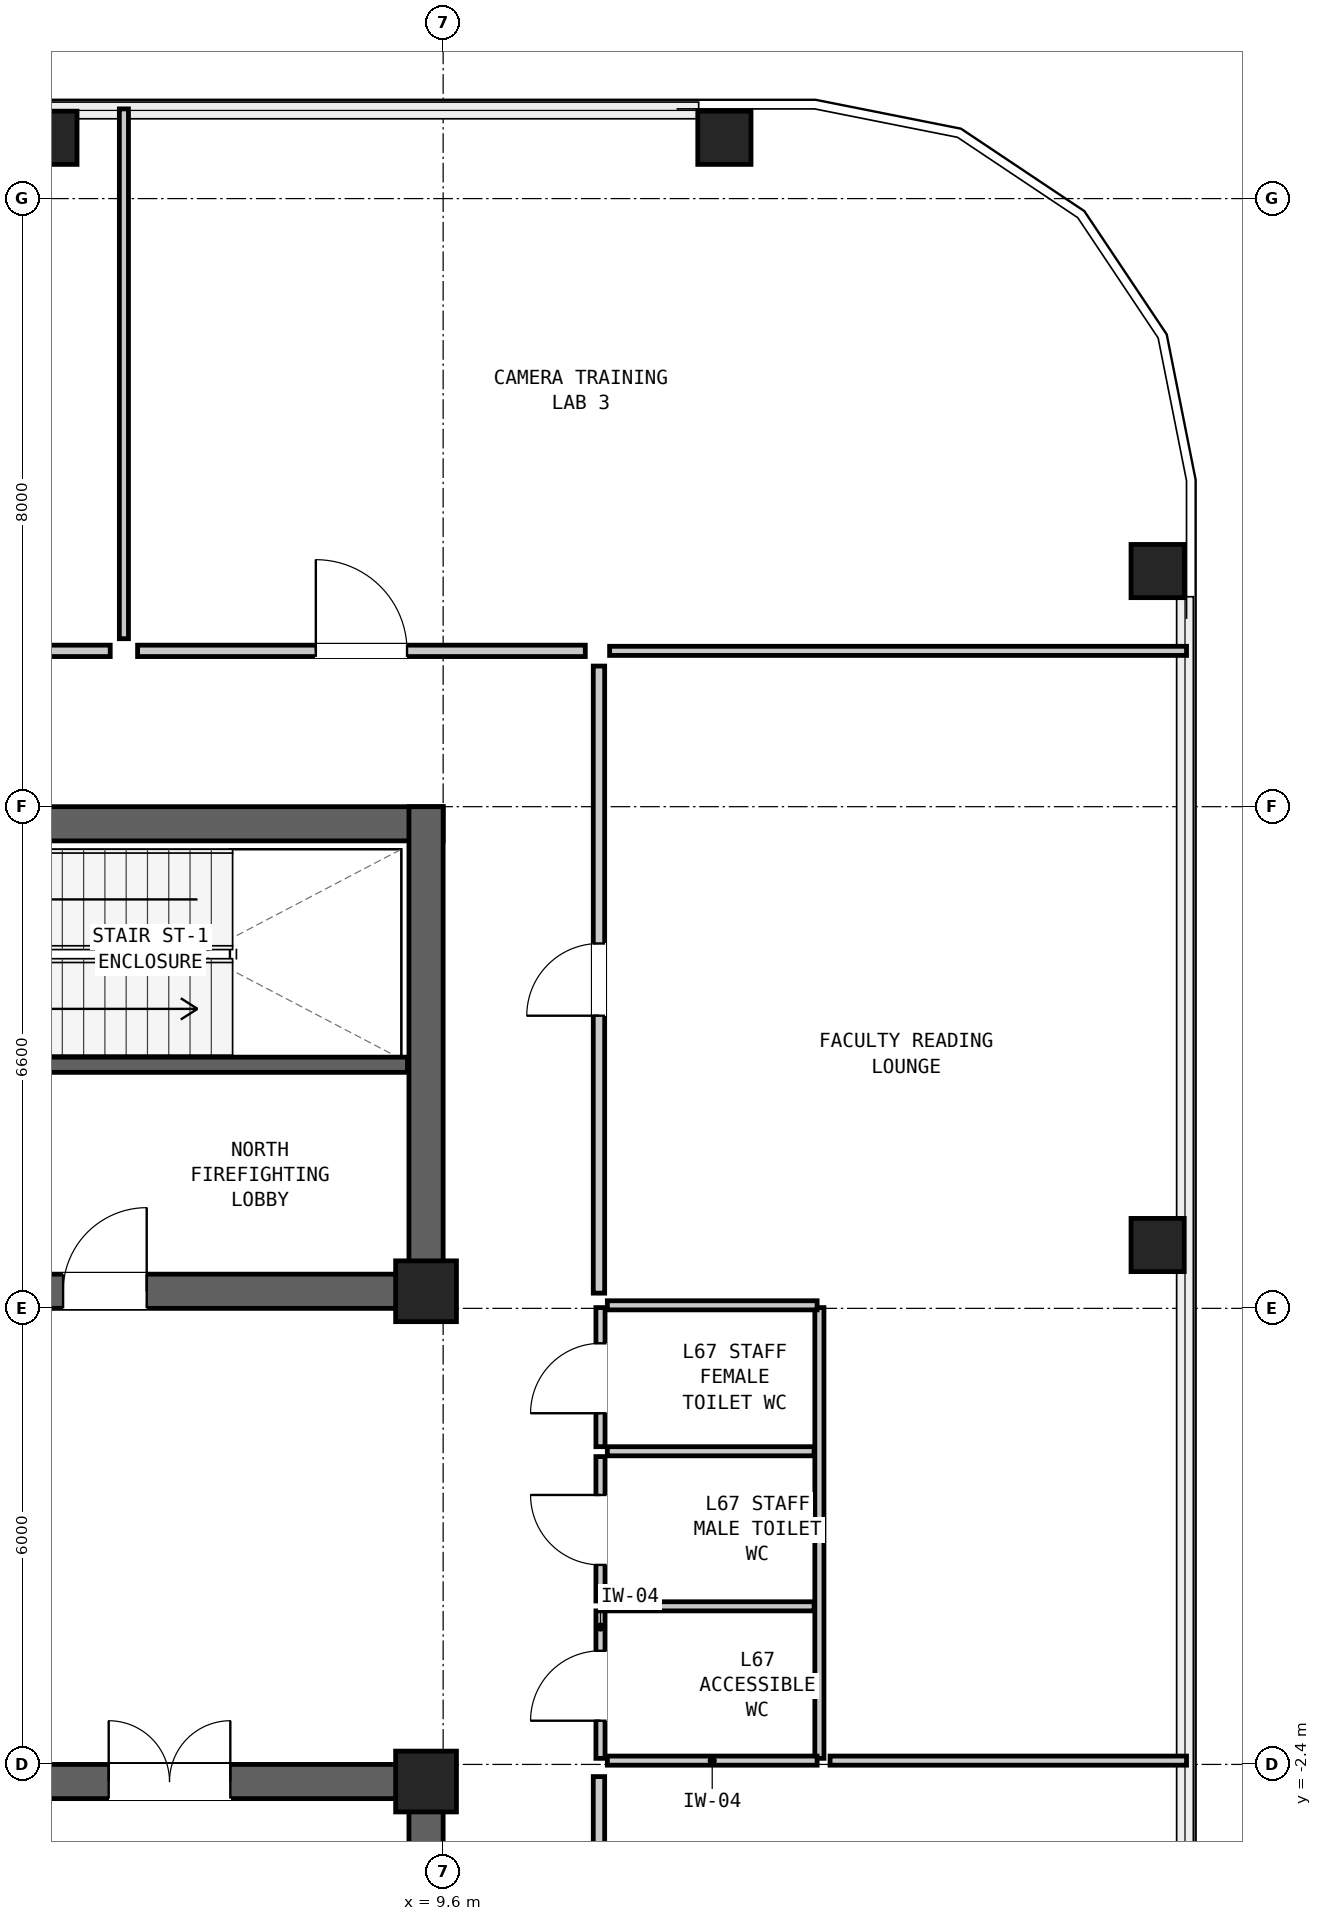
"""IFC4 building model, lengths in metres.
Left out: names, types, materials, properties, quantities, classifications, styles, units other than length and angle.
Written with IfcOpenShell. Run it as: python <this file> out.ifc"""

import sys

from ifc_helpers import new_model, si_unit, direction, frame, frame_2d, origin, origin_2d, place, context, subcontext, project, spatial, rectangle, hollow_rectangle, extrude, element, fill, save


model = new_model("IFC4")
c1 = context("Model", 3, precision=1e-05, world=origin(), true_north=direction((0.0, 1.0)))
c2 = subcontext(c1, "Body", "Model", "MODEL_VIEW")
j1 = project(units=[si_unit("LENGTHUNIT", "METRE"), si_unit("PLANEANGLEUNIT", "RADIAN")], contexts=[c1])
p1 = place(None, origin())
s1 = spatial("IfcSite", under=j1, at=p1, CompositionType="ELEMENT")
p2 = place(p1, origin())
s2 = spatial("IfcBuilding", under=s1, at=p2, CompositionType="ELEMENT")
p3 = place(p2, frame((0.0, 0.0, 226.95)))
s3 = spatial("IfcBuildingStorey", under=s2, at=p3, CompositionType="ELEMENT", Elevation=226.95)
p4 = place(p3, frame((-9.6, 9.975, 0.0), z_axis=(0.0, 0.0, 1.0), x_axis=(1.0, 0.0, 0.0)))
e1 = element("IfcWall", 1, at=p4, inside=s3, PredefinedType="SHEAR", context=c2, shape_type="SweptSolid", body=[
    extrude(rectangle(XDim=19.2, YDim=0.45, at=frame_2d((9.6, 0.0))), origin(), (0.0, 0.0, 1.0), 4.35),
])
p5 = place(p3, frame((-9.6, 3.825, 0.0), z_axis=(0.0, 0.0, 1.0), x_axis=(1.0, 0.0, 0.0)))
e2 = element("IfcWall", 2, at=p5, inside=s3, PredefinedType="SHEAR", context=c2, shape_type="SweptSolid", body=[
    extrude(rectangle(XDim=19.2, YDim=0.45, at=frame_2d((9.6, 0.0))), origin(), (0.0, 0.0, 1.0), 4.35),
])
p6 = place(p5, frame((14.2, 0.0, 0.0)))
e3 = element("IfcOpeningElement", 3, at=p6, cuts=e2, PredefinedType="OPENING", context=c2, shape_type="SweptSolid", body=[
    extrude(rectangle(XDim=1.1, YDim=2.08, at=frame_2d((0.55, 1.04))), frame((0.0, 0.237, 0.0), z_axis=(0.0, -1.0, 0.0), x_axis=(1.0, 0.0, 0.0)), (0.0, 0.0, 1.0), 0.474),
])
p7 = place(p5, frame((8.2, 0.0, 0.0)))
e4 = element("IfcOpeningElement", 4, at=p7, cuts=e2, PredefinedType="OPENING", context=c2, shape_type="SweptSolid", body=[
    extrude(rectangle(XDim=1.15, YDim=2.1, at=frame_2d((0.575, 1.05))), frame((0.0, 0.237, 0.0), z_axis=(0.0, -1.0, 0.0), x_axis=(1.0, 0.0, 0.0)), (0.0, 0.0, 1.0), 0.474),
])
p8 = place(p5, frame((2.5, 0.0, 0.0)))
e5 = element("IfcOpeningElement", 5, at=p8, cuts=e2, PredefinedType="OPENING", context=c2, shape_type="SweptSolid", body=[
    extrude(rectangle(XDim=1.2, YDim=2.1, at=frame_2d((0.6, 1.05))), frame((0.0, 0.237, 0.0), z_axis=(0.0, -1.0, 0.0), x_axis=(1.0, 0.0, 0.0)), (0.0, 0.0, 1.0), 0.474),
])
p9 = place(p3, frame((9.375, 3.6, 0.0), z_axis=(0.0, 0.0, 1.0), x_axis=(0.0, 1.0, 0.0)))
e6 = element("IfcWall", 6, at=p9, inside=s3, PredefinedType="SHEAR", context=c2, shape_type="SweptSolid", body=[
    extrude(rectangle(XDim=6.6, YDim=0.45, at=frame_2d((3.3, 0.0))), origin(), (0.0, 0.0, 1.0), 4.35),
])
p10 = place(p3, frame((-9.6, -2.625, 0.0), z_axis=(0.0, 0.0, 1.0), x_axis=(1.0, 0.0, 0.0)))
e7 = element("IfcWall", 7, at=p10, inside=s3, PredefinedType="SHEAR", context=c2, shape_type="SweptSolid", body=[
    extrude(rectangle(XDim=19.2, YDim=0.45, at=frame_2d((9.6, 0.0))), origin(), (0.0, 0.0, 1.0), 4.35),
])
p11 = place(p10, frame((3.8, 0.0, 0.0)))
e8 = element("IfcOpeningElement", 8, at=p11, cuts=e7, PredefinedType="OPENING", context=c2, shape_type="SweptSolid", body=[
    extrude(rectangle(XDim=1.1, YDim=2.08, at=frame_2d((0.55, 1.04))), frame((0.0, 0.237, 0.0), z_axis=(0.0, -1.0, 0.0), x_axis=(1.0, 0.0, 0.0)), (0.0, 0.0, 1.0), 0.474),
])
p12 = place(p10, frame((10.8, 0.0, 0.0)))
e9 = element("IfcOpeningElement", 9, at=p12, cuts=e7, PredefinedType="OPENING", context=c2, shape_type="SweptSolid", body=[
    extrude(rectangle(XDim=0.95, YDim=2.1, at=frame_2d((0.475, 1.05))), frame((0.0, 0.237, 0.0), z_axis=(0.0, -1.0, 0.0), x_axis=(1.0, 0.0, 0.0)), (0.0, 0.0, 1.0), 0.474),
])
p13 = place(p10, frame((14.8, 0.0, 0.0)))
e10 = element("IfcOpeningElement", 10, at=p13, cuts=e7, PredefinedType="OPENING", context=c2, shape_type="SweptSolid", body=[
    extrude(rectangle(XDim=1.6, YDim=2.12, at=frame_2d((0.8, 1.06))), frame((0.0, 0.237, 0.0), z_axis=(0.0, -1.0, 0.0), x_axis=(1.0, 0.0, 0.0)), (0.0, 0.0, 1.0), 0.474),
])
p14 = place(p3, frame((9.375, -9.0, 0.0), z_axis=(0.0, 0.0, 1.0), x_axis=(0.0, 1.0, 0.0)))
e11 = element("IfcWall", 11, at=p14, inside=s3, PredefinedType="SHEAR", context=c2, shape_type="SweptSolid", body=[
    extrude(rectangle(XDim=6.6, YDim=0.45, at=frame_2d((3.3, 0.0))), origin(), (0.0, 0.0, 1.0), 4.35),
])
for number, where, z_axis, x_axis in (
    (12, (19.0, 4.433, 0.0), (0.0, 0.0, 1.0), (0.0, 1.0, 0.0)),
    (13, (19.0, 13.3, 0.0), (0.0, 0.0, 1.0), (0.0, 1.0, 0.0)),
    (14, (13.3, 19.0, 0.0), (0.0, 0.0, 1.0), (1.0, 0.0, 0.0)),
    (15, (4.433, 19.0, 0.0), (0.0, 0.0, 1.0), (1.0, 0.0, 0.0)),
):
    element("IfcColumn", number, at=place(p3, frame(where, z_axis=z_axis, x_axis=x_axis)), inside=s3, PredefinedType="COLUMN", context=c2, shape_type="SweptSolid", body=[
        extrude(hollow_rectangle(XDim=0.7, YDim=0.7, WallThickness=0.045, at=origin_2d()), origin(), (0.0, 0.0, 1.0), 4.35),
    ])
for number, where, z_axis, x_axis in (
    (16, (9.375, 3.825, 0.0), (0.0, 0.0, 1.0), (1.0, 0.0, 0.0)),
    (17, (9.375, -2.625, 0.0), (0.0, 0.0, 1.0), (1.0, 0.0, 0.0)),
):
    element("IfcColumn", number, at=place(p3, frame(where, z_axis=z_axis, x_axis=x_axis)), inside=s3, PredefinedType="COLUMN", context=c2, shape_type="SweptSolid", body=[
        extrude(rectangle(XDim=0.8, YDim=0.8, at=origin_2d()), origin(), (0.0, 0.0, 1.0), 4.35),
    ])
p15 = place(p3, frame((2.36, 6.805, 0.0), z_axis=(0.0, 0.0, 1.0), x_axis=(1.0, 0.0, 0.0)))
e18 = element("IfcWall", 18, at=p15, inside=s3, PredefinedType="SHEAR", context=c2, shape_type="SweptSolid", body=[
    extrude(rectangle(XDim=6.77, YDim=0.2, at=frame_2d((3.385, 0.0))), origin(), (0.0, 0.0, 1.0), 4.07),
])
p16 = place(p15, frame((0.3, 0.0, 0.0)))
e19 = element("IfcOpeningElement", 19, at=p16, cuts=e18, PredefinedType="OPENING", context=c2, shape_type="SweptSolid", body=[
    extrude(rectangle(XDim=1.05, YDim=2.08, at=frame_2d((0.525, 1.04))), frame((0.0, 0.112, 0.0), z_axis=(0.0, -1.0, 0.0), x_axis=(1.0, 0.0, 0.0)), (0.0, 0.0, 1.0), 0.224),
])
p17 = place(p3, frame((11.67, -2.32, 0.0), z_axis=(0.0, 0.0, 1.0), x_axis=(0.0, 1.0, 0.0)))
e20 = element("IfcWall", 20, at=p17, inside=s3, PredefinedType="PARTITIONING", context=c2, shape_type="SweptSolid", body=[
    extrude(rectangle(XDim=1.94, YDim=0.12, at=frame_2d((0.97, 0.0))), origin(), (0.0, 0.0, 1.0), 4.07),
])
p18 = place(p17, frame((0.495, 0.0, 0.0)))
e21 = element("IfcOpeningElement", 21, at=p18, cuts=e20, PredefinedType="OPENING", context=c2, shape_type="SweptSolid", body=[
    extrude(rectangle(XDim=0.92, YDim=2.1, at=frame_2d((0.46, 1.05))), frame((0.0, 0.072, 0.0), z_axis=(0.0, -1.0, 0.0), x_axis=(1.0, 0.0, 0.0)), (0.0, 0.0, 1.0), 0.144),
])
p19 = place(p3, frame((11.67, -0.25, 0.0), z_axis=(0.0, 0.0, 1.0), x_axis=(0.0, 1.0, 0.0)))
e22 = element("IfcWall", 22, at=p19, inside=s3, PredefinedType="PARTITIONING", context=c2, shape_type="SweptSolid", body=[
    extrude(rectangle(XDim=1.9, YDim=0.12, at=frame_2d((0.95, 0.0))), origin(), (0.0, 0.0, 1.0), 4.07),
])
p20 = place(p19, frame((0.475, 0.0, 0.0)))
e23 = element("IfcOpeningElement", 23, at=p20, cuts=e22, PredefinedType="OPENING", context=c2, shape_type="SweptSolid", body=[
    extrude(rectangle(XDim=0.92, YDim=2.1, at=frame_2d((0.46, 1.05))), frame((0.0, 0.072, 0.0), z_axis=(0.0, -1.0, 0.0), x_axis=(1.0, 0.0, 0.0)), (0.0, 0.0, 1.0), 0.144),
])
p21 = place(p3, frame((11.67, 1.78, 0.0), z_axis=(0.0, 0.0, 1.0), x_axis=(0.0, 1.0, 0.0)))
e24 = element("IfcWall", 24, at=p21, inside=s3, PredefinedType="PARTITIONING", context=c2, shape_type="SweptSolid", body=[
    extrude(rectangle(XDim=1.83, YDim=0.12, at=frame_2d((0.915, 0.0))), origin(), (0.0, 0.0, 1.0), 4.07),
])
p22 = place(p21, frame((0.44, 0.0, 0.0)))
e25 = element("IfcOpeningElement", 25, at=p22, cuts=e24, PredefinedType="OPENING", context=c2, shape_type="SweptSolid", body=[
    extrude(rectangle(XDim=0.92, YDim=2.1, at=frame_2d((0.46, 1.05))), frame((0.0, 0.072, 0.0), z_axis=(0.0, -1.0, 0.0), x_axis=(1.0, 0.0, 0.0)), (0.0, 0.0, 1.0), 0.144),
])
p23 = place(p3, frame((14.55, -2.32, 0.0), z_axis=(0.0, 0.0, 1.0), x_axis=(0.0, 1.0, 0.0)))
e26 = element("IfcWall", 26, at=p23, inside=s3, PredefinedType="PARTITIONING", context=c2, shape_type="SweptSolid", body=[
    extrude(rectangle(XDim=5.93, YDim=0.12, at=frame_2d((2.965, 0.0))), origin(), (0.0, 0.0, 1.0), 4.07),
])
for number, where, z_axis, x_axis in (
    (27, (11.76, -2.35, 0.0), (0.0, 0.0, 1.0), (1.0, 0.0, 0.0)),
    (28, (11.76, 3.64, 0.0), (0.0, 0.0, 1.0), (1.0, 0.0, 0.0)),
):
    element("IfcWall", number, at=place(p3, frame(where, z_axis=z_axis, x_axis=x_axis)), inside=s3, PredefinedType="PARTITIONING", context=c2, shape_type="SweptSolid", body=[
        extrude(rectangle(XDim=2.76, YDim=0.12, at=frame_2d((1.38, 0.0))), origin(), (0.0, 0.0, 1.0), 2.25),
    ])
p24 = place(p3, frame((11.76, -0.32, 0.0), z_axis=(0.0, 0.0, 1.0), x_axis=(1.0, 0.0, 0.0)))
e29 = element("IfcWall", 29, at=p24, inside=s3, PredefinedType="PARTITIONING", context=c2, shape_type="SweptSolid", body=[
    extrude(rectangle(XDim=2.72, YDim=0.12, at=frame_2d((1.36, 0.0))), origin(), (0.0, 0.0, 1.0), 4.07),
])
p25 = place(p3, frame((11.76, 1.72, 0.0), z_axis=(0.0, 0.0, 1.0), x_axis=(1.0, 0.0, 0.0)))
e30 = element("IfcWall", 30, at=p25, inside=s3, PredefinedType="PARTITIONING", context=c2, shape_type="SweptSolid", body=[
    extrude(rectangle(XDim=2.72, YDim=0.12, at=frame_2d((1.36, 0.0))), origin(), (0.0, 0.0, 1.0), 2.25),
])
p26 = place(p3, frame((11.79, 12.25, 0.0), z_axis=(0.0, 0.0, 1.0), x_axis=(1.0, 0.0, 0.0)))
e31 = element("IfcWall", 31, at=p26, inside=s3, PredefinedType="PARTITIONING", context=c2, shape_type="SweptSolid", body=[
    extrude(rectangle(XDim=7.59, YDim=0.12, at=frame_2d((3.795, 0.0))), origin(), (0.0, 0.0, 1.0), 4.07),
])
p27 = place(p3, frame((5.4, 12.41, 0.0), z_axis=(0.0, 0.0, 1.0), x_axis=(0.0, 1.0, 0.0)))
e32 = element("IfcWall", 32, at=p27, inside=s3, PredefinedType="PARTITIONING", context=c2, shape_type="SweptSolid", body=[
    extrude(rectangle(XDim=6.97, YDim=0.12, at=frame_2d((3.485, 0.0))), origin(), (0.0, 0.0, 1.0), 4.07),
])
p28 = place(p3, frame((14.69, -2.35, 0.0), z_axis=(0.0, 0.0, 1.0), x_axis=(1.0, 0.0, 0.0)))
e33 = element("IfcWall", 33, at=p28, inside=s3, PredefinedType="PARTITIONING", context=c2, shape_type="SweptSolid", body=[
    extrude(rectangle(XDim=4.69, YDim=0.12, at=frame_2d((2.345, 0.0))), origin(), (0.0, 0.0, 1.0), 2.25),
])
p29 = place(p3, frame((-5.22, 12.25, 0.0), z_axis=(0.0, 0.0, 1.0), x_axis=(1.0, 0.0, 0.0)))
e34 = element("IfcWall", 34, at=p29, inside=s3, PredefinedType="PARTITIONING", context=c2, shape_type="SweptSolid", body=[
    extrude(rectangle(XDim=10.44, YDim=0.15, at=frame_2d((5.22, 0.0))), origin(), (0.0, 0.0, 1.0), 2.25),
])
p30 = place(p29, frame((4.62, 0.0, 0.0)))
e35 = element("IfcOpeningElement", 35, at=p30, cuts=e34, PredefinedType="OPENING", context=c2, shape_type="SweptSolid", body=[
    extrude(rectangle(XDim=1.2, YDim=2.1, at=frame_2d((0.6, 1.05))), frame((0.0, 0.087, 0.0), z_axis=(0.0, -1.0, 0.0), x_axis=(1.0, 0.0, 0.0)), (0.0, 0.0, 1.0), 0.174),
])
p31 = place(p3, frame((5.58, 12.25, 0.0), z_axis=(0.0, 0.0, 1.0), x_axis=(1.0, 0.0, 0.0)))
e36 = element("IfcWall", 36, at=p31, inside=s3, PredefinedType="PARTITIONING", context=c2, shape_type="SweptSolid", body=[
    extrude(rectangle(XDim=5.89, YDim=0.15, at=frame_2d((2.945, 0.0))), origin(), (0.0, 0.0, 1.0), 2.25),
])
p32 = place(p31, frame((2.345, 0.0, 0.0)))
e37 = element("IfcOpeningElement", 37, at=p32, cuts=e36, PredefinedType="OPENING", context=c2, shape_type="SweptSolid", body=[
    extrude(rectangle(XDim=1.2, YDim=2.1, at=frame_2d((0.6, 1.05))), frame((0.0, 0.087, 0.0), z_axis=(0.0, -1.0, 0.0), x_axis=(1.0, 0.0, 0.0)), (0.0, 0.0, 1.0), 0.174),
])
p33 = place(p3, frame((11.65, -10.85, 0.0), z_axis=(0.0, 0.0, 1.0), x_axis=(0.0, 1.0, 0.0)))
e38 = element("IfcWall", 38, at=p33, inside=s3, PredefinedType="PARTITIONING", context=c2, shape_type="SweptSolid", body=[
    extrude(rectangle(XDim=8.29, YDim=0.15, at=frame_2d((4.145, 0.0))), origin(), (0.0, 0.0, 1.0), 4.07),
])
p34 = place(p33, frame((3.67, 0.0, 0.0)))
e39 = element("IfcOpeningElement", 39, at=p34, cuts=e38, PredefinedType="OPENING", context=c2, shape_type="SweptSolid", body=[
    extrude(rectangle(XDim=0.95, YDim=2.1, at=frame_2d((0.475, 1.05))), frame((0.0, 0.087, 0.0), z_axis=(0.0, -1.0, 0.0), x_axis=(1.0, 0.0, 0.0)), (0.0, 0.0, 1.0), 0.174),
])
p35 = place(p3, frame((11.65, 3.8, 0.0), z_axis=(0.0, 0.0, 1.0), x_axis=(0.0, 1.0, 0.0)))
e40 = element("IfcWall", 40, at=p35, inside=s3, PredefinedType="PARTITIONING", context=c2, shape_type="SweptSolid", body=[
    extrude(rectangle(XDim=8.25, YDim=0.15, at=frame_2d((4.125, 0.0))), origin(), (0.0, 0.0, 1.0), 4.07),
])
p36 = place(p35, frame((3.65, 0.0, 0.0)))
e41 = element("IfcOpeningElement", 41, at=p36, cuts=e40, PredefinedType="OPENING", context=c2, shape_type="SweptSolid", body=[
    extrude(rectangle(XDim=0.95, YDim=2.1, at=frame_2d((0.475, 1.05))), frame((0.0, 0.087, 0.0), z_axis=(0.0, -1.0, 0.0), x_axis=(1.0, 0.0, 0.0)), (0.0, 0.0, 1.0), 0.174),
])
p37 = place(p6, origin())
e42 = element("IfcDoor", 42, at=p37, inside=s3, OperationType="SINGLE_SWING_RIGHT", PredefinedType="DOOR", context=c2, shape_type="SweptSolid", body=[
    extrude(rectangle(XDim=1.1, YDim=2.08, at=frame_2d((0.55, 1.04))), frame((0.0, 0.025, 0.0), z_axis=(0.0, -1.0, 0.0), x_axis=(1.0, 0.0, 0.0)), (0.0, 0.0, 1.0), 0.05),
])
fill(e3, e42)
p38 = place(p13, origin())
e43 = element("IfcDoor", 43, at=p38, inside=s3, OperationType="DOUBLE_DOOR_SINGLE_SWING", PredefinedType="DOOR", context=c2, shape_type="SweptSolid", body=[
    extrude(rectangle(XDim=1.6, YDim=2.12, at=frame_2d((0.8, 1.06))), frame((0.0, 0.025, 0.0), z_axis=(0.0, -1.0, 0.0), x_axis=(1.0, 0.0, 0.0)), (0.0, 0.0, 1.0), 0.05),
])
fill(e10, e43)
p39 = place(p18, origin())
e44 = element("IfcDoor", 44, at=p39, inside=s3, OperationType="SINGLE_SWING_LEFT", PredefinedType="DOOR", context=c2, shape_type="SweptSolid", body=[
    extrude(rectangle(XDim=0.92, YDim=2.1, at=frame_2d((0.46, 1.05))), frame((0.0, 0.025, 0.0), z_axis=(0.0, -1.0, 0.0), x_axis=(1.0, 0.0, 0.0)), (0.0, 0.0, 1.0), 0.05),
])
fill(e21, e44)
p40 = place(p20, origin())
e45 = element("IfcDoor", 45, at=p40, inside=s3, OperationType="SINGLE_SWING_RIGHT", PredefinedType="DOOR", context=c2, shape_type="SweptSolid", body=[
    extrude(rectangle(XDim=0.92, YDim=2.1, at=frame_2d((0.46, 1.05))), frame((0.0, 0.025, 0.0), z_axis=(0.0, -1.0, 0.0), x_axis=(1.0, 0.0, 0.0)), (0.0, 0.0, 1.0), 0.05),
])
fill(e23, e45)
p41 = place(p22, origin())
e46 = element("IfcDoor", 46, at=p41, inside=s3, OperationType="SINGLE_SWING_LEFT", PredefinedType="DOOR", context=c2, shape_type="SweptSolid", body=[
    extrude(rectangle(XDim=0.92, YDim=2.1, at=frame_2d((0.46, 1.05))), frame((0.0, 0.025, 0.0), z_axis=(0.0, -1.0, 0.0), x_axis=(1.0, 0.0, 0.0)), (0.0, 0.0, 1.0), 0.05),
])
fill(e25, e46)
p42 = place(p32, origin())
e47 = element("IfcDoor", 47, at=p42, inside=s3, OperationType="SINGLE_SWING_LEFT", PredefinedType="DOOR", context=c2, shape_type="SweptSolid", body=[
    extrude(rectangle(XDim=1.2, YDim=2.1, at=frame_2d((0.6, 1.05))), frame((0.0, 0.025, 0.0), z_axis=(0.0, -1.0, 0.0), x_axis=(1.0, 0.0, 0.0)), (0.0, 0.0, 1.0), 0.05),
])
fill(e37, e47)
p43 = place(p36, origin())
e48 = element("IfcDoor", 48, at=p43, inside=s3, OperationType="SINGLE_SWING_LEFT", PredefinedType="DOOR", context=c2, shape_type="SweptSolid", body=[
    extrude(rectangle(XDim=0.95, YDim=2.1, at=frame_2d((0.475, 1.05))), frame((0.0, 0.025, 0.0), z_axis=(0.0, -1.0, 0.0), x_axis=(1.0, 0.0, 0.0)), (0.0, 0.0, 1.0), 0.05),
])
fill(e41, e48)
save(model, sys.argv[1])
